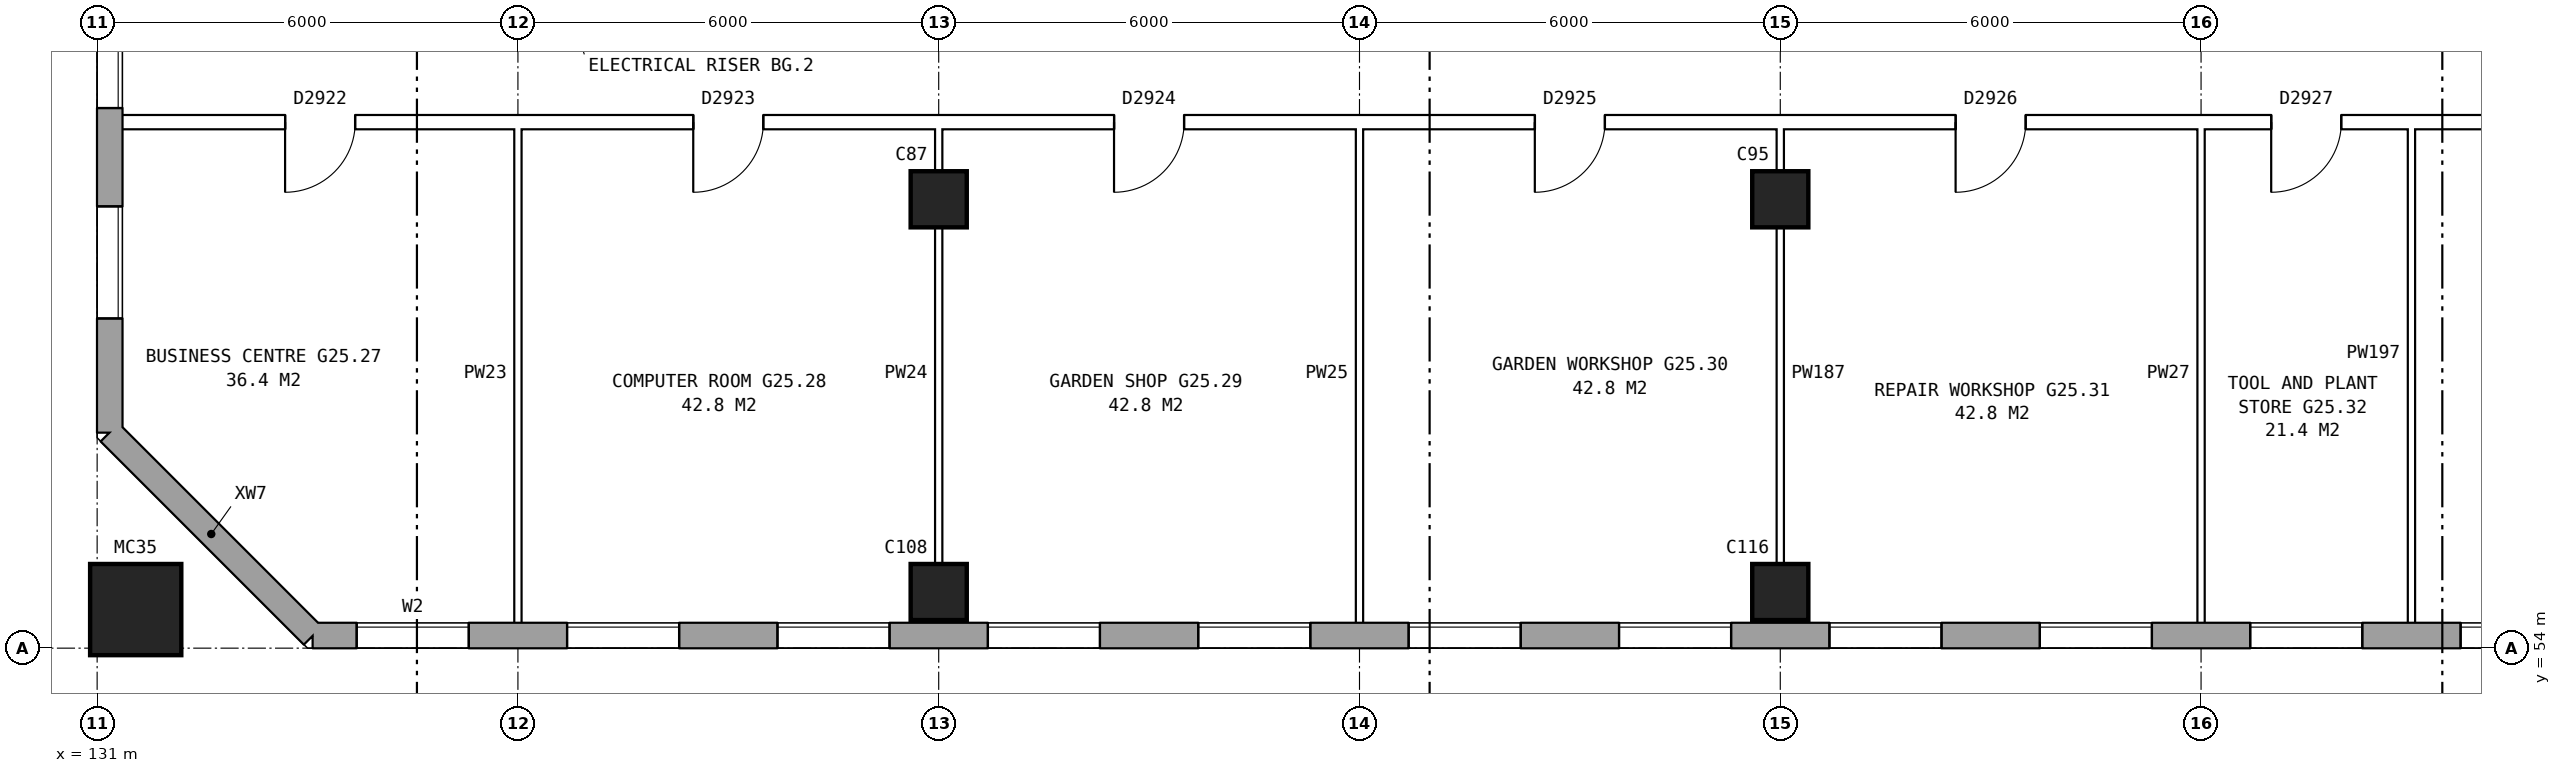
"""IFC4 building model, lengths in metres.
Left out: names, types, materials, properties, quantities, classifications, styles, units other than length and angle.
Written with IfcOpenShell. Run it as: python <this file> out.ifc"""

import sys

from ifc_helpers import new_model, si_unit, direction, frame, frame_2d, origin, origin_2d, place, context, subcontext, project, spatial, rectangle, hollow_rectangle, extrude, element, fill, save


model = new_model("IFC4")
c1 = context("Model", 3, precision=1e-05, world=origin(), true_north=direction((0.0, 1.0)))
c2 = subcontext(c1, "Body", "Model", "MODEL_VIEW")
j1 = project(units=[si_unit("LENGTHUNIT", "METRE"), si_unit("PLANEANGLEUNIT", "RADIAN")], contexts=[c1])
p1 = place(None, origin())
s1 = spatial("IfcSite", under=j1, at=p1, CompositionType="ELEMENT")
p2 = place(p1, origin())
s2 = spatial("IfcBuilding", under=s1, at=p2, CompositionType="ELEMENT")
p3 = place(p2, frame((0.0, 0.0, 90.2)))
s3 = spatial("IfcBuildingStorey", under=s2, at=p3, CompositionType="ELEMENT", Elevation=90.2)
for number, where, z_axis, x_axis in (
    (1, (143.0, 54.8, 0.0), (0.0, 0.0, 1.0), (1.0, 0.0, 0.0)),
    (2, (143.0, 60.4, 0.0), (0.0, 0.0, 1.0), (1.0, 0.0, 0.0)),
    (3, (155.0, 54.8, 0.0), (0.0, 0.0, 1.0), (1.0, 0.0, 0.0)),
    (4, (155.0, 60.4, 0.0), (0.0, 0.0, 1.0), (1.0, 0.0, 0.0)),
):
    element("IfcColumn", number, at=place(p3, frame(where, z_axis=z_axis, x_axis=x_axis)), inside=s3, PredefinedType="COLUMN", context=c2, shape_type="SweptSolid", body=[
        extrude(rectangle(XDim=0.8, YDim=0.8, at=origin_2d()), origin(), (0.0, 0.0, 1.0), 5.6),
    ])
p4 = place(p3, frame((131.55, 54.55, 0.0), z_axis=(0.0, 0.0, 1.0), x_axis=(1.0, 0.0, 0.0)))
e5 = element("IfcColumn", 5, at=p4, inside=s3, PredefinedType="COLUMN", context=c2, shape_type="SweptSolid", body=[
    extrude(hollow_rectangle(XDim=1.3, YDim=1.3, WallThickness=0.07, at=origin_2d()), origin(), (0.0, 0.0, 1.0), 6.2),
])
p5 = place(p3, frame((131.18, 57.075, 0.0), z_axis=(0.0, 0.0, 1.0), x_axis=(0.707106781187, -0.707106781187, 0.0)))
e6 = element("IfcWall", 6, at=p5, inside=s3, PredefinedType="STANDARD", context=c2, shape_type="SweptSolid", body=[
    extrude(rectangle(XDim=4.094, YDim=0.36, at=frame_2d((2.047, 0.0))), origin(), (0.0, 0.0, 1.0), 5.6),
])
p6 = place(p3, frame((134.075, 54.18, 0.0), z_axis=(0.0, 0.0, 1.0), x_axis=(1.0, 0.0, 0.0)))
e7 = element("IfcWall", 7, at=p6, inside=s3, PredefinedType="STANDARD", context=c2, shape_type="SweptSolid", body=[
    extrude(rectangle(XDim=36.851, YDim=0.36, at=frame_2d((18.425, 0.0))), origin(), (0.0, 0.0, 1.0), 5.6),
])
p7 = place(p6, frame((0.625, 0.0, 0.15)))
e8 = element("IfcOpeningElement", 8, at=p7, cuts=e7, PredefinedType="OPENING", context=c2, shape_type="SweptSolid", body=[
    extrude(rectangle(XDim=1.6, YDim=2.4, at=frame_2d((0.8, 1.2))), frame((0.0, 0.19, 0.0), z_axis=(0.0, -1.0, 0.0), x_axis=(1.0, 0.0, 0.0)), (0.0, 0.0, 1.0), 0.38),
])
p8 = place(p6, frame((3.625, 0.0, 0.15)))
e9 = element("IfcOpeningElement", 9, at=p8, cuts=e7, PredefinedType="OPENING", context=c2, shape_type="SweptSolid", body=[
    extrude(rectangle(XDim=1.6, YDim=2.4, at=frame_2d((0.8, 1.2))), frame((0.0, 0.19, 0.0), z_axis=(0.0, -1.0, 0.0), x_axis=(1.0, 0.0, 0.0)), (0.0, 0.0, 1.0), 0.38),
])
p9 = place(p6, frame((6.625, 0.0, 0.15)))
e10 = element("IfcOpeningElement", 10, at=p9, cuts=e7, PredefinedType="OPENING", context=c2, shape_type="SweptSolid", body=[
    extrude(rectangle(XDim=1.6, YDim=2.4, at=frame_2d((0.8, 1.2))), frame((0.0, 0.19, 0.0), z_axis=(0.0, -1.0, 0.0), x_axis=(1.0, 0.0, 0.0)), (0.0, 0.0, 1.0), 0.38),
])
p10 = place(p6, frame((9.625, 0.0, 0.15)))
e11 = element("IfcOpeningElement", 11, at=p10, cuts=e7, PredefinedType="OPENING", context=c2, shape_type="SweptSolid", body=[
    extrude(rectangle(XDim=1.6, YDim=2.4, at=frame_2d((0.8, 1.2))), frame((0.0, 0.19, 0.0), z_axis=(0.0, -1.0, 0.0), x_axis=(1.0, 0.0, 0.0)), (0.0, 0.0, 1.0), 0.38),
])
p11 = place(p6, frame((12.625, 0.0, 0.15)))
e12 = element("IfcOpeningElement", 12, at=p11, cuts=e7, PredefinedType="OPENING", context=c2, shape_type="SweptSolid", body=[
    extrude(rectangle(XDim=1.6, YDim=2.4, at=frame_2d((0.8, 1.2))), frame((0.0, 0.19, 0.0), z_axis=(0.0, -1.0, 0.0), x_axis=(1.0, 0.0, 0.0)), (0.0, 0.0, 1.0), 0.38),
])
p12 = place(p6, frame((15.625, 0.0, 0.15)))
e13 = element("IfcOpeningElement", 13, at=p12, cuts=e7, PredefinedType="OPENING", context=c2, shape_type="SweptSolid", body=[
    extrude(rectangle(XDim=1.6, YDim=2.4, at=frame_2d((0.8, 1.2))), frame((0.0, 0.19, 0.0), z_axis=(0.0, -1.0, 0.0), x_axis=(1.0, 0.0, 0.0)), (0.0, 0.0, 1.0), 0.38),
])
p13 = place(p6, frame((18.625, 0.0, 0.15)))
e14 = element("IfcOpeningElement", 14, at=p13, cuts=e7, PredefinedType="OPENING", context=c2, shape_type="SweptSolid", body=[
    extrude(rectangle(XDim=1.6, YDim=2.4, at=frame_2d((0.8, 1.2))), frame((0.0, 0.19, 0.0), z_axis=(0.0, -1.0, 0.0), x_axis=(1.0, 0.0, 0.0)), (0.0, 0.0, 1.0), 0.38),
])
p14 = place(p6, frame((21.625, 0.0, 0.15)))
e15 = element("IfcOpeningElement", 15, at=p14, cuts=e7, PredefinedType="OPENING", context=c2, shape_type="SweptSolid", body=[
    extrude(rectangle(XDim=1.6, YDim=2.4, at=frame_2d((0.8, 1.2))), frame((0.0, 0.19, 0.0), z_axis=(0.0, -1.0, 0.0), x_axis=(1.0, 0.0, 0.0)), (0.0, 0.0, 1.0), 0.38),
])
p15 = place(p6, frame((24.625, 0.0, 0.15)))
e16 = element("IfcOpeningElement", 16, at=p15, cuts=e7, PredefinedType="OPENING", context=c2, shape_type="SweptSolid", body=[
    extrude(rectangle(XDim=1.6, YDim=2.4, at=frame_2d((0.8, 1.2))), frame((0.0, 0.19, 0.0), z_axis=(0.0, -1.0, 0.0), x_axis=(1.0, 0.0, 0.0)), (0.0, 0.0, 1.0), 0.38),
])
p16 = place(p6, frame((27.625, 0.0, 0.15)))
e17 = element("IfcOpeningElement", 17, at=p16, cuts=e7, PredefinedType="OPENING", context=c2, shape_type="SweptSolid", body=[
    extrude(rectangle(XDim=1.6, YDim=2.4, at=frame_2d((0.8, 1.2))), frame((0.0, 0.19, 0.0), z_axis=(0.0, -1.0, 0.0), x_axis=(1.0, 0.0, 0.0)), (0.0, 0.0, 1.0), 0.38),
])
p17 = place(p6, frame((30.625, 0.0, 0.15)))
e18 = element("IfcOpeningElement", 18, at=p17, cuts=e7, PredefinedType="OPENING", context=c2, shape_type="SweptSolid", body=[
    extrude(rectangle(XDim=1.6, YDim=2.4, at=frame_2d((0.8, 1.2))), frame((0.0, 0.19, 0.0), z_axis=(0.0, -1.0, 0.0), x_axis=(1.0, 0.0, 0.0)), (0.0, 0.0, 1.0), 0.38),
])
p18 = place(p6, frame((33.625, 0.0, 0.15)))
e19 = element("IfcOpeningElement", 19, at=p18, cuts=e7, PredefinedType="OPENING", context=c2, shape_type="SweptSolid", body=[
    extrude(rectangle(XDim=1.6, YDim=2.4, at=frame_2d((0.8, 1.2))), frame((0.0, 0.19, 0.0), z_axis=(0.0, -1.0, 0.0), x_axis=(1.0, 0.0, 0.0)), (0.0, 0.0, 1.0), 0.38),
])
p19 = place(p3, frame((131.18, 82.925, 0.0), z_axis=(0.0, 0.0, 1.0), x_axis=(0.0, -1.0, 0.0)))
e20 = element("IfcWall", 20, at=p19, inside=s3, PredefinedType="STANDARD", context=c2, shape_type="SweptSolid", body=[
    extrude(rectangle(XDim=25.851, YDim=0.36, at=frame_2d((12.925, 0.0))), origin(), (0.0, 0.0, 1.0), 5.6),
])
p20 = place(p19, frame((1.625, 0.0, 0.15)))
e21 = element("IfcOpeningElement", 21, at=p20, cuts=e20, PredefinedType="OPENING", context=c2, shape_type="SweptSolid", body=[
    extrude(rectangle(XDim=1.6, YDim=2.4, at=frame_2d((0.8, 1.2))), frame((0.0, 0.19, 0.0), z_axis=(0.0, -1.0, 0.0), x_axis=(1.0, 0.0, 0.0)), (0.0, 0.0, 1.0), 0.38),
])
p21 = place(p19, frame((4.625, 0.0, 0.15)))
e22 = element("IfcOpeningElement", 22, at=p21, cuts=e20, PredefinedType="OPENING", context=c2, shape_type="SweptSolid", body=[
    extrude(rectangle(XDim=1.6, YDim=2.4, at=frame_2d((0.8, 1.2))), frame((0.0, 0.19, 0.0), z_axis=(0.0, -1.0, 0.0), x_axis=(1.0, 0.0, 0.0)), (0.0, 0.0, 1.0), 0.38),
])
p22 = place(p19, frame((19.625, 0.0, 0.15)))
e23 = element("IfcOpeningElement", 23, at=p22, cuts=e20, PredefinedType="OPENING", context=c2, shape_type="SweptSolid", body=[
    extrude(rectangle(XDim=1.6, YDim=2.4, at=frame_2d((0.8, 1.2))), frame((0.0, 0.19, 0.0), z_axis=(0.0, -1.0, 0.0), x_axis=(1.0, 0.0, 0.0)), (0.0, 0.0, 1.0), 0.38),
])
p23 = place(p19, frame((22.625, 0.0, 0.15)))
e24 = element("IfcOpeningElement", 24, at=p23, cuts=e20, PredefinedType="OPENING", context=c2, shape_type="SweptSolid", body=[
    extrude(rectangle(XDim=1.6, YDim=2.4, at=frame_2d((0.8, 1.2))), frame((0.0, 0.19, 0.0), z_axis=(0.0, -1.0, 0.0), x_axis=(1.0, 0.0, 0.0)), (0.0, 0.0, 1.0), 0.38),
])
p24 = place(p3, frame((131.24, 61.5, 0.0), z_axis=(0.0, 0.0, 1.0), x_axis=(1.0, 0.0, 0.0)))
e25 = element("IfcWall", 25, at=p24, inside=s3, PredefinedType="PARTITIONING", context=c2, shape_type="SweptSolid", body=[
    extrude(rectangle(XDim=42.52, YDim=0.2, at=frame_2d((21.26, 0.0))), origin(), (0.0, 0.0, 1.0), 5.6),
])
p25 = place(p24, frame((2.44, 0.0, 0.0)))
e26 = element("IfcOpeningElement", 26, at=p25, cuts=e25, PredefinedType="OPENING", context=c2, shape_type="SweptSolid", body=[
    extrude(rectangle(XDim=1.0, YDim=2.1, at=frame_2d((0.5, 1.05))), frame((0.0, 0.11, 0.0), z_axis=(0.0, -1.0, 0.0), x_axis=(1.0, 0.0, 0.0)), (0.0, 0.0, 1.0), 0.22),
])
p26 = place(p24, frame((8.26, 0.0, 0.0)))
e27 = element("IfcOpeningElement", 27, at=p26, cuts=e25, PredefinedType="OPENING", context=c2, shape_type="SweptSolid", body=[
    extrude(rectangle(XDim=1.0, YDim=2.1, at=frame_2d((0.5, 1.05))), frame((0.0, 0.11, 0.0), z_axis=(0.0, -1.0, 0.0), x_axis=(1.0, 0.0, 0.0)), (0.0, 0.0, 1.0), 0.22),
])
p27 = place(p24, frame((14.26, 0.0, 0.0)))
e28 = element("IfcOpeningElement", 28, at=p27, cuts=e25, PredefinedType="OPENING", context=c2, shape_type="SweptSolid", body=[
    extrude(rectangle(XDim=1.0, YDim=2.1, at=frame_2d((0.5, 1.05))), frame((0.0, 0.11, 0.0), z_axis=(0.0, -1.0, 0.0), x_axis=(1.0, 0.0, 0.0)), (0.0, 0.0, 1.0), 0.22),
])
p28 = place(p24, frame((20.26, 0.0, 0.0)))
e29 = element("IfcOpeningElement", 29, at=p28, cuts=e25, PredefinedType="OPENING", context=c2, shape_type="SweptSolid", body=[
    extrude(rectangle(XDim=1.0, YDim=2.1, at=frame_2d((0.5, 1.05))), frame((0.0, 0.11, 0.0), z_axis=(0.0, -1.0, 0.0), x_axis=(1.0, 0.0, 0.0)), (0.0, 0.0, 1.0), 0.22),
])
p29 = place(p24, frame((26.26, 0.0, 0.0)))
e30 = element("IfcOpeningElement", 30, at=p29, cuts=e25, PredefinedType="OPENING", context=c2, shape_type="SweptSolid", body=[
    extrude(rectangle(XDim=1.0, YDim=2.1, at=frame_2d((0.5, 1.05))), frame((0.0, 0.11, 0.0), z_axis=(0.0, -1.0, 0.0), x_axis=(1.0, 0.0, 0.0)), (0.0, 0.0, 1.0), 0.22),
])
p30 = place(p24, frame((30.76, 0.0, 0.0)))
e31 = element("IfcOpeningElement", 31, at=p30, cuts=e25, PredefinedType="OPENING", context=c2, shape_type="SweptSolid", body=[
    extrude(rectangle(XDim=1.0, YDim=2.1, at=frame_2d((0.5, 1.05))), frame((0.0, 0.11, 0.0), z_axis=(0.0, -1.0, 0.0), x_axis=(1.0, 0.0, 0.0)), (0.0, 0.0, 1.0), 0.22),
])
p31 = place(p24, frame((37.08, 0.0, 0.0)))
e32 = element("IfcOpeningElement", 32, at=p31, cuts=e25, PredefinedType="OPENING", context=c2, shape_type="SweptSolid", body=[
    extrude(rectangle(XDim=1.0, YDim=2.1, at=frame_2d((0.5, 1.05))), frame((0.0, 0.11, 0.0), z_axis=(0.0, -1.0, 0.0), x_axis=(1.0, 0.0, 0.0)), (0.0, 0.0, 1.0), 0.22),
])
for number, where, z_axis, x_axis in (
    (33, (137.0, 54.24, 0.0), (0.0, 0.0, 1.0), (0.0, 1.0, 0.0)),
    (34, (143.0, 54.24, 0.0), (0.0, 0.0, 1.0), (0.0, 1.0, 0.0)),
    (35, (149.0, 54.24, 0.0), (0.0, 0.0, 1.0), (0.0, 1.0, 0.0)),
    (36, (155.0, 54.24, 0.0), (0.0, 0.0, 1.0), (0.0, 1.0, 0.0)),
    (37, (161.0, 54.24, 0.0), (0.0, 0.0, 1.0), (0.0, 1.0, 0.0)),
    (38, (164.0, 54.24, 0.0), (0.0, 0.0, 1.0), (0.0, 1.0, 0.0)),
):
    element("IfcWall", number, at=place(p3, frame(where, z_axis=z_axis, x_axis=x_axis)), inside=s3, PredefinedType="PARTITIONING", context=c2, shape_type="SweptSolid", body=[
        extrude(rectangle(XDim=7.36, YDim=0.1, at=frame_2d((3.68, 0.0))), origin(), (0.0, 0.0, 1.0), 5.6),
    ])
p32 = place(p7, origin())
e39 = element("IfcWindow", 39, at=p32, inside=s3, PartitioningType="SINGLE_PANEL", PredefinedType="WINDOW", context=c2, shape_type="SweptSolid", body=[
    extrude(rectangle(XDim=1.6, YDim=2.4, at=frame_2d((0.8, 1.2))), frame((0.0, 0.15, 0.0), z_axis=(0.0, -1.0, 0.0), x_axis=(1.0, 0.0, 0.0)), (0.0, 0.0, 1.0), 0.06),
])
fill(e8, e39)
p33 = place(p8, origin())
e40 = element("IfcWindow", 40, at=p33, inside=s3, PartitioningType="SINGLE_PANEL", PredefinedType="WINDOW", context=c2, shape_type="SweptSolid", body=[
    extrude(rectangle(XDim=1.6, YDim=2.4, at=frame_2d((0.8, 1.2))), frame((0.0, 0.15, 0.0), z_axis=(0.0, -1.0, 0.0), x_axis=(1.0, 0.0, 0.0)), (0.0, 0.0, 1.0), 0.06),
])
fill(e9, e40)
p34 = place(p9, origin())
e41 = element("IfcWindow", 41, at=p34, inside=s3, PartitioningType="SINGLE_PANEL", PredefinedType="WINDOW", context=c2, shape_type="SweptSolid", body=[
    extrude(rectangle(XDim=1.6, YDim=2.4, at=frame_2d((0.8, 1.2))), frame((0.0, 0.15, 0.0), z_axis=(0.0, -1.0, 0.0), x_axis=(1.0, 0.0, 0.0)), (0.0, 0.0, 1.0), 0.06),
])
fill(e10, e41)
p35 = place(p10, origin())
e42 = element("IfcWindow", 42, at=p35, inside=s3, PartitioningType="SINGLE_PANEL", PredefinedType="WINDOW", context=c2, shape_type="SweptSolid", body=[
    extrude(rectangle(XDim=1.6, YDim=2.4, at=frame_2d((0.8, 1.2))), frame((0.0, 0.15, 0.0), z_axis=(0.0, -1.0, 0.0), x_axis=(1.0, 0.0, 0.0)), (0.0, 0.0, 1.0), 0.06),
])
fill(e11, e42)
p36 = place(p11, origin())
e43 = element("IfcWindow", 43, at=p36, inside=s3, PartitioningType="SINGLE_PANEL", PredefinedType="WINDOW", context=c2, shape_type="SweptSolid", body=[
    extrude(rectangle(XDim=1.6, YDim=2.4, at=frame_2d((0.8, 1.2))), frame((0.0, 0.15, 0.0), z_axis=(0.0, -1.0, 0.0), x_axis=(1.0, 0.0, 0.0)), (0.0, 0.0, 1.0), 0.06),
])
fill(e12, e43)
p37 = place(p12, origin())
e44 = element("IfcWindow", 44, at=p37, inside=s3, PartitioningType="SINGLE_PANEL", PredefinedType="WINDOW", context=c2, shape_type="SweptSolid", body=[
    extrude(rectangle(XDim=1.6, YDim=2.4, at=frame_2d((0.8, 1.2))), frame((0.0, 0.15, 0.0), z_axis=(0.0, -1.0, 0.0), x_axis=(1.0, 0.0, 0.0)), (0.0, 0.0, 1.0), 0.06),
])
fill(e13, e44)
p38 = place(p13, origin())
e45 = element("IfcWindow", 45, at=p38, inside=s3, PartitioningType="SINGLE_PANEL", PredefinedType="WINDOW", context=c2, shape_type="SweptSolid", body=[
    extrude(rectangle(XDim=1.6, YDim=2.4, at=frame_2d((0.8, 1.2))), frame((0.0, 0.15, 0.0), z_axis=(0.0, -1.0, 0.0), x_axis=(1.0, 0.0, 0.0)), (0.0, 0.0, 1.0), 0.06),
])
fill(e14, e45)
p39 = place(p14, origin())
e46 = element("IfcWindow", 46, at=p39, inside=s3, PartitioningType="SINGLE_PANEL", PredefinedType="WINDOW", context=c2, shape_type="SweptSolid", body=[
    extrude(rectangle(XDim=1.6, YDim=2.4, at=frame_2d((0.8, 1.2))), frame((0.0, 0.15, 0.0), z_axis=(0.0, -1.0, 0.0), x_axis=(1.0, 0.0, 0.0)), (0.0, 0.0, 1.0), 0.06),
])
fill(e15, e46)
p40 = place(p15, origin())
e47 = element("IfcWindow", 47, at=p40, inside=s3, PartitioningType="SINGLE_PANEL", PredefinedType="WINDOW", context=c2, shape_type="SweptSolid", body=[
    extrude(rectangle(XDim=1.6, YDim=2.4, at=frame_2d((0.8, 1.2))), frame((0.0, 0.15, 0.0), z_axis=(0.0, -1.0, 0.0), x_axis=(1.0, 0.0, 0.0)), (0.0, 0.0, 1.0), 0.06),
])
fill(e16, e47)
p41 = place(p16, origin())
e48 = element("IfcWindow", 48, at=p41, inside=s3, PartitioningType="SINGLE_PANEL", PredefinedType="WINDOW", context=c2, shape_type="SweptSolid", body=[
    extrude(rectangle(XDim=1.6, YDim=2.4, at=frame_2d((0.8, 1.2))), frame((0.0, 0.15, 0.0), z_axis=(0.0, -1.0, 0.0), x_axis=(1.0, 0.0, 0.0)), (0.0, 0.0, 1.0), 0.06),
])
fill(e17, e48)
p42 = place(p17, origin())
e49 = element("IfcWindow", 49, at=p42, inside=s3, PartitioningType="SINGLE_PANEL", PredefinedType="WINDOW", context=c2, shape_type="SweptSolid", body=[
    extrude(rectangle(XDim=1.6, YDim=2.4, at=frame_2d((0.8, 1.2))), frame((0.0, 0.15, 0.0), z_axis=(0.0, -1.0, 0.0), x_axis=(1.0, 0.0, 0.0)), (0.0, 0.0, 1.0), 0.06),
])
fill(e18, e49)
p43 = place(p22, origin())
e50 = element("IfcWindow", 50, at=p43, inside=s3, PartitioningType="SINGLE_PANEL", PredefinedType="WINDOW", context=c2, shape_type="SweptSolid", body=[
    extrude(rectangle(XDim=1.6, YDim=2.4, at=frame_2d((0.8, 1.2))), frame((0.0, 0.15, 0.0), z_axis=(0.0, -1.0, 0.0), x_axis=(1.0, 0.0, 0.0)), (0.0, 0.0, 1.0), 0.06),
])
fill(e23, e50)
p44 = place(p23, origin())
e51 = element("IfcWindow", 51, at=p44, inside=s3, PartitioningType="SINGLE_PANEL", PredefinedType="WINDOW", context=c2, shape_type="SweptSolid", body=[
    extrude(rectangle(XDim=1.6, YDim=2.4, at=frame_2d((0.8, 1.2))), frame((0.0, 0.15, 0.0), z_axis=(0.0, -1.0, 0.0), x_axis=(1.0, 0.0, 0.0)), (0.0, 0.0, 1.0), 0.06),
])
fill(e24, e51)
p45 = place(p25, frame((1.0, 0.0, 0.0), z_axis=(0.0, 0.0, 1.0), x_axis=(-1.0, 0.0, 0.0)))
e52 = element("IfcDoor", 52, at=p45, inside=s3, OperationType="SINGLE_SWING_RIGHT", PredefinedType="DOOR", context=c2, shape_type="SweptSolid", body=[
    extrude(rectangle(XDim=1.0, YDim=2.1, at=frame_2d((0.5, 1.05))), frame((0.0, 0.025, 0.0), z_axis=(0.0, -1.0, 0.0), x_axis=(1.0, 0.0, 0.0)), (0.0, 0.0, 1.0), 0.05),
])
fill(e26, e52)
p46 = place(p26, frame((1.0, 0.0, 0.0), z_axis=(0.0, 0.0, 1.0), x_axis=(-1.0, 0.0, 0.0)))
e53 = element("IfcDoor", 53, at=p46, inside=s3, OperationType="SINGLE_SWING_RIGHT", PredefinedType="DOOR", context=c2, shape_type="SweptSolid", body=[
    extrude(rectangle(XDim=1.0, YDim=2.1, at=frame_2d((0.5, 1.05))), frame((0.0, 0.025, 0.0), z_axis=(0.0, -1.0, 0.0), x_axis=(1.0, 0.0, 0.0)), (0.0, 0.0, 1.0), 0.05),
])
fill(e27, e53)
p47 = place(p27, frame((1.0, 0.0, 0.0), z_axis=(0.0, 0.0, 1.0), x_axis=(-1.0, 0.0, 0.0)))
e54 = element("IfcDoor", 54, at=p47, inside=s3, OperationType="SINGLE_SWING_RIGHT", PredefinedType="DOOR", context=c2, shape_type="SweptSolid", body=[
    extrude(rectangle(XDim=1.0, YDim=2.1, at=frame_2d((0.5, 1.05))), frame((0.0, 0.025, 0.0), z_axis=(0.0, -1.0, 0.0), x_axis=(1.0, 0.0, 0.0)), (0.0, 0.0, 1.0), 0.05),
])
fill(e28, e54)
p48 = place(p28, frame((1.0, 0.0, 0.0), z_axis=(0.0, 0.0, 1.0), x_axis=(-1.0, 0.0, 0.0)))
e55 = element("IfcDoor", 55, at=p48, inside=s3, OperationType="SINGLE_SWING_RIGHT", PredefinedType="DOOR", context=c2, shape_type="SweptSolid", body=[
    extrude(rectangle(XDim=1.0, YDim=2.1, at=frame_2d((0.5, 1.05))), frame((0.0, 0.025, 0.0), z_axis=(0.0, -1.0, 0.0), x_axis=(1.0, 0.0, 0.0)), (0.0, 0.0, 1.0), 0.05),
])
fill(e29, e55)
p49 = place(p29, frame((1.0, 0.0, 0.0), z_axis=(0.0, 0.0, 1.0), x_axis=(-1.0, 0.0, 0.0)))
e56 = element("IfcDoor", 56, at=p49, inside=s3, OperationType="SINGLE_SWING_RIGHT", PredefinedType="DOOR", context=c2, shape_type="SweptSolid", body=[
    extrude(rectangle(XDim=1.0, YDim=2.1, at=frame_2d((0.5, 1.05))), frame((0.0, 0.025, 0.0), z_axis=(0.0, -1.0, 0.0), x_axis=(1.0, 0.0, 0.0)), (0.0, 0.0, 1.0), 0.05),
])
fill(e30, e56)
p50 = place(p30, frame((1.0, 0.0, 0.0), z_axis=(0.0, 0.0, 1.0), x_axis=(-1.0, 0.0, 0.0)))
e57 = element("IfcDoor", 57, at=p50, inside=s3, OperationType="SINGLE_SWING_RIGHT", PredefinedType="DOOR", context=c2, shape_type="SweptSolid", body=[
    extrude(rectangle(XDim=1.0, YDim=2.1, at=frame_2d((0.5, 1.05))), frame((0.0, 0.025, 0.0), z_axis=(0.0, -1.0, 0.0), x_axis=(1.0, 0.0, 0.0)), (0.0, 0.0, 1.0), 0.05),
])
fill(e31, e57)
save(model, sys.argv[1])
